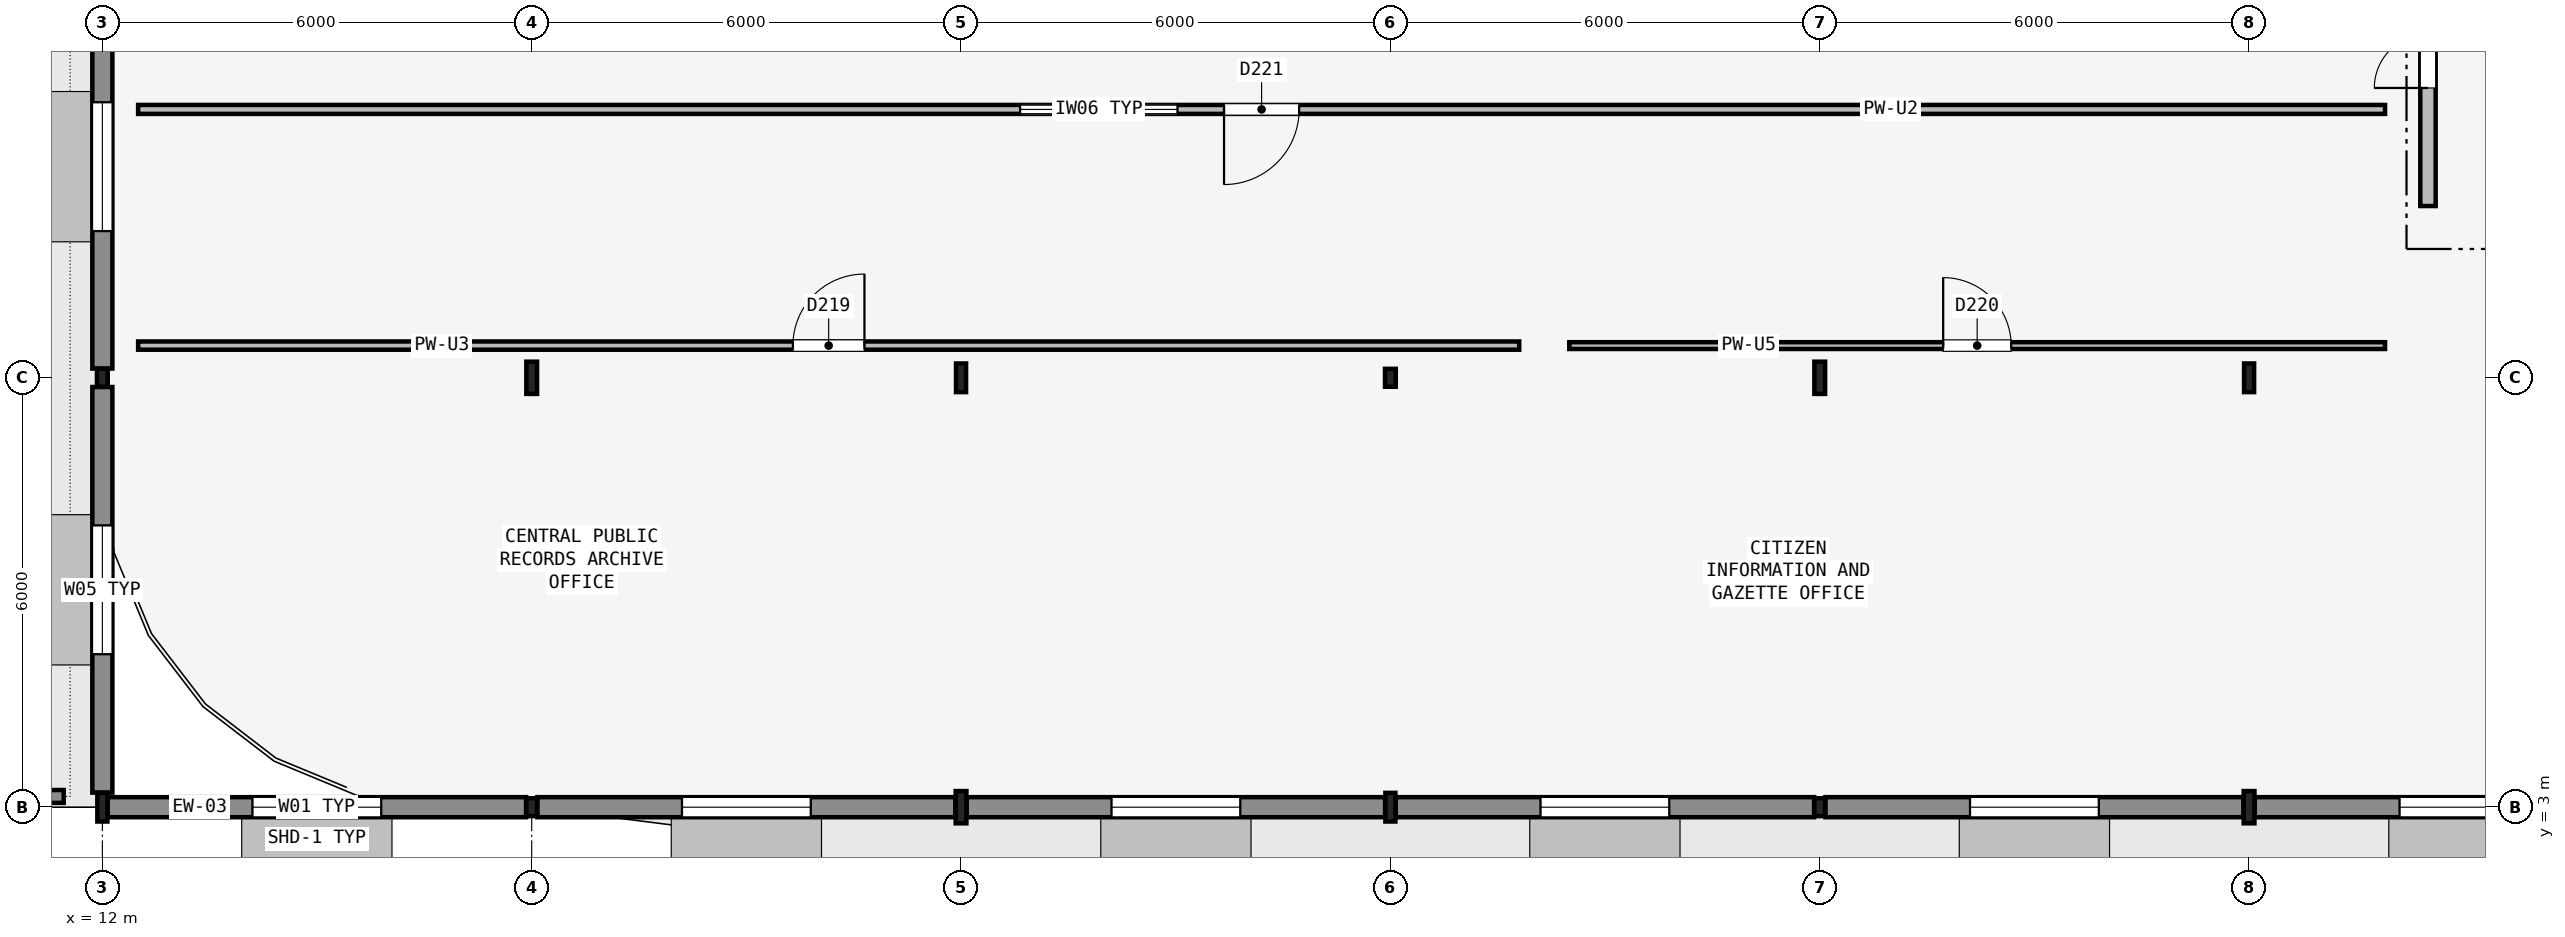
"""IFC4 building model, lengths in metres.
Left out: names, types, materials, properties, quantities, classifications, styles, units other than length and angle.
Written with IfcOpenShell. Run it as: python <this file> out.ifc"""

import sys

from ifc_helpers import new_model, si_unit, direction, frame, frame_2d, origin, origin_2d, place, context, subcontext, project, spatial, rectangle, hollow_rectangle, i_section, extrude, element, fill, save


model = new_model("IFC4")
c1 = context("Model", 3, precision=1e-05, world=origin(), true_north=direction((0.0, 1.0)))
c2 = subcontext(c1, "Body", "Model", "MODEL_VIEW")
j1 = project(units=[si_unit("LENGTHUNIT", "METRE"), si_unit("PLANEANGLEUNIT", "RADIAN")], contexts=[c1])
p1 = place(None, origin())
s1 = spatial("IfcSite", under=j1, at=p1, CompositionType="ELEMENT")
p2 = place(p1, origin())
s2 = spatial("IfcBuilding", under=s1, at=p2, CompositionType="ELEMENT")
p3 = place(p2, frame((0.0, 0.0, 9.3)))
s3 = spatial("IfcBuildingStorey", under=s2, at=p3, CompositionType="ELEMENT", Elevation=9.3)
p4 = place(p3, frame((12.0, 3.0, 0.0), z_axis=(0.0, 0.0, 1.0), x_axis=(1.0, 0.0, 0.0)))
e1 = element("IfcColumn", 1, at=p4, inside=s3, PredefinedType="COLUMN", context=c2, shape_type="SweptSolid", body=[
    extrude(i_section(OverallWidth=0.14, OverallDepth=0.4, WebThickness=0.009, FlangeThickness=0.016, FilletRadius=0.014, at=origin_2d()), origin(), (0.0, 0.0, 1.0), 4.2),
])
for number, where, z_axis, x_axis in (
    (2, (12.0, 9.0, 0.0), (0.0, 0.0, 1.0), (1.0, 0.0, 0.0)),
    (3, (18.0, 3.0, 0.0), (0.0, 0.0, 1.0), (1.0, 0.0, 0.0)),
):
    element("IfcColumn", number, at=place(p3, frame(where, z_axis=z_axis, x_axis=x_axis)), inside=s3, PredefinedType="COLUMN", context=c2, shape_type="SweptSolid", body=[
        extrude(hollow_rectangle(XDim=0.15, YDim=0.25, WallThickness=0.01, InnerFilletRadius=0.01, OuterFilletRadius=0.02, at=origin_2d()), origin(), (0.0, 0.0, 1.0), 4.2),
    ])
for number, where, z_axis, x_axis in (
    (4, (18.0, 9.0, 0.0), (0.0, 0.0, 1.0), (1.0, 0.0, 0.0)),
    (5, (24.0, 3.0, 0.0), (0.0, 0.0, 1.0), (1.0, 0.0, 0.0)),
):
    element("IfcColumn", number, at=place(p3, frame(where, z_axis=z_axis, x_axis=x_axis)), inside=s3, PredefinedType="COLUMN", context=c2, shape_type="SweptSolid", body=[
        extrude(i_section(OverallWidth=0.15, OverallDepth=0.45, WebThickness=0.01, FlangeThickness=0.017, FilletRadius=0.015, at=origin_2d()), origin(), (0.0, 0.0, 1.0), 4.2),
    ])
for number, where, z_axis, x_axis in (
    (6, (24.0, 9.0, 0.0), (0.0, 0.0, 1.0), (1.0, 0.0, 0.0)),
    (7, (30.0, 3.0, 0.0), (0.0, 0.0, 1.0), (1.0, 0.0, 0.0)),
):
    element("IfcColumn", number, at=place(p3, frame(where, z_axis=z_axis, x_axis=x_axis)), inside=s3, PredefinedType="COLUMN", context=c2, shape_type="SweptSolid", body=[
        extrude(i_section(OverallWidth=0.14, OverallDepth=0.4, WebThickness=0.009, FlangeThickness=0.016, FilletRadius=0.014, at=origin_2d()), origin(), (0.0, 0.0, 1.0), 4.2),
    ])
for number, where, z_axis, x_axis in (
    (8, (30.0, 9.0, 0.0), (0.0, 0.0, 1.0), (1.0, 0.0, 0.0)),
    (9, (36.0, 3.0, 0.0), (0.0, 0.0, 1.0), (1.0, 0.0, 0.0)),
):
    element("IfcColumn", number, at=place(p3, frame(where, z_axis=z_axis, x_axis=x_axis)), inside=s3, PredefinedType="COLUMN", context=c2, shape_type="SweptSolid", body=[
        extrude(hollow_rectangle(XDim=0.15, YDim=0.25, WallThickness=0.01, InnerFilletRadius=0.01, OuterFilletRadius=0.02, at=origin_2d()), origin(), (0.0, 0.0, 1.0), 4.2),
    ])
for number, where, z_axis, x_axis in (
    (10, (36.0, 9.0, 0.0), (0.0, 0.0, 1.0), (1.0, 0.0, 0.0)),
    (11, (42.0, 3.0, 0.0), (0.0, 0.0, 1.0), (1.0, 0.0, 0.0)),
):
    element("IfcColumn", number, at=place(p3, frame(where, z_axis=z_axis, x_axis=x_axis)), inside=s3, PredefinedType="COLUMN", context=c2, shape_type="SweptSolid", body=[
        extrude(i_section(OverallWidth=0.15, OverallDepth=0.45, WebThickness=0.01, FlangeThickness=0.017, FilletRadius=0.015, at=origin_2d()), origin(), (0.0, 0.0, 1.0), 4.2),
    ])
p5 = place(p3, frame((42.0, 9.0, 0.0), z_axis=(0.0, 0.0, 1.0), x_axis=(1.0, 0.0, 0.0)))
e12 = element("IfcColumn", 12, at=p5, inside=s3, PredefinedType="COLUMN", context=c2, shape_type="SweptSolid", body=[
    extrude(i_section(OverallWidth=0.14, OverallDepth=0.4, WebThickness=0.009, FlangeThickness=0.016, FilletRadius=0.014, at=origin_2d()), origin(), (0.0, 0.0, 1.0), 4.2),
])
p6 = place(p3, frame((12.074, 3.0, 0.0), z_axis=(0.0, 0.0, 1.0), x_axis=(1.0, 0.0, 0.0)))
e13 = element("IfcWall", 13, at=p6, inside=s3, PredefinedType="SOLIDWALL", context=c2, shape_type="SweptSolid", body=[
    extrude(rectangle(XDim=5.847, YDim=0.28, at=frame_2d((2.923, 0.0))), origin(), (0.0, 0.0, 1.0), 3.484),
])
p7 = place(p6, frame((2.023, 0.0, 0.9)))
e14 = element("IfcOpeningElement", 14, at=p7, cuts=e13, PredefinedType="OPENING", context=c2, shape_type="SweptSolid", body=[
    extrude(rectangle(XDim=1.8, YDim=1.5, at=frame_2d((0.9, 0.75))), frame((0.0, 0.15, 0.0), z_axis=(0.0, -1.0, 0.0), x_axis=(1.0, 0.0, 0.0)), (0.0, 0.0, 1.0), 0.3),
])
p8 = place(p3, frame((18.079, 3.0, 0.0), z_axis=(0.0, 0.0, 1.0), x_axis=(1.0, 0.0, 0.0)))
e15 = element("IfcWall", 15, at=p8, inside=s3, PredefinedType="SOLIDWALL", context=c2, shape_type="SweptSolid", body=[
    extrude(rectangle(XDim=5.842, YDim=0.28, at=frame_2d((2.921, 0.0))), origin(), (0.0, 0.0, 1.0), 3.484),
])
p9 = place(p8, frame((2.021, 0.0, 0.9)))
e16 = element("IfcOpeningElement", 16, at=p9, cuts=e15, PredefinedType="OPENING", context=c2, shape_type="SweptSolid", body=[
    extrude(rectangle(XDim=1.8, YDim=1.5, at=frame_2d((0.9, 0.75))), frame((0.0, 0.15, 0.0), z_axis=(0.0, -1.0, 0.0), x_axis=(1.0, 0.0, 0.0)), (0.0, 0.0, 1.0), 0.3),
])
p10 = place(p3, frame((24.079, 3.0, 0.0), z_axis=(0.0, 0.0, 1.0), x_axis=(1.0, 0.0, 0.0)))
e17 = element("IfcWall", 17, at=p10, inside=s3, PredefinedType="SOLIDWALL", context=c2, shape_type="SweptSolid", body=[
    extrude(rectangle(XDim=5.847, YDim=0.28, at=frame_2d((2.923, 0.0))), origin(), (0.0, 0.0, 1.0), 3.484),
])
p11 = place(p10, frame((2.023, 0.0, 0.9)))
e18 = element("IfcOpeningElement", 18, at=p11, cuts=e17, PredefinedType="OPENING", context=c2, shape_type="SweptSolid", body=[
    extrude(rectangle(XDim=1.8, YDim=1.5, at=frame_2d((0.9, 0.75))), frame((0.0, 0.15, 0.0), z_axis=(0.0, -1.0, 0.0), x_axis=(1.0, 0.0, 0.0)), (0.0, 0.0, 1.0), 0.3),
])
p12 = place(p3, frame((30.074, 3.0, 0.0), z_axis=(0.0, 0.0, 1.0), x_axis=(1.0, 0.0, 0.0)))
e19 = element("IfcWall", 19, at=p12, inside=s3, PredefinedType="SOLIDWALL", context=c2, shape_type="SweptSolid", body=[
    extrude(rectangle(XDim=5.847, YDim=0.28, at=frame_2d((2.923, 0.0))), origin(), (0.0, 0.0, 1.0), 3.484),
])
p13 = place(p12, frame((2.023, 0.0, 0.9)))
e20 = element("IfcOpeningElement", 20, at=p13, cuts=e19, PredefinedType="OPENING", context=c2, shape_type="SweptSolid", body=[
    extrude(rectangle(XDim=1.8, YDim=1.5, at=frame_2d((0.9, 0.75))), frame((0.0, 0.15, 0.0), z_axis=(0.0, -1.0, 0.0), x_axis=(1.0, 0.0, 0.0)), (0.0, 0.0, 1.0), 0.3),
])
p14 = place(p3, frame((36.079, 3.0, 0.0), z_axis=(0.0, 0.0, 1.0), x_axis=(1.0, 0.0, 0.0)))
e21 = element("IfcWall", 21, at=p14, inside=s3, PredefinedType="SOLIDWALL", context=c2, shape_type="SweptSolid", body=[
    extrude(rectangle(XDim=5.842, YDim=0.28, at=frame_2d((2.921, 0.0))), origin(), (0.0, 0.0, 1.0), 3.484),
])
p15 = place(p14, frame((2.021, 0.0, 0.9)))
e22 = element("IfcOpeningElement", 22, at=p15, cuts=e21, PredefinedType="OPENING", context=c2, shape_type="SweptSolid", body=[
    extrude(rectangle(XDim=1.8, YDim=1.5, at=frame_2d((0.9, 0.75))), frame((0.0, 0.15, 0.0), z_axis=(0.0, -1.0, 0.0), x_axis=(1.0, 0.0, 0.0)), (0.0, 0.0, 1.0), 0.3),
])
p16 = place(p3, frame((42.079, 3.0, 0.0), z_axis=(0.0, 0.0, 1.0), x_axis=(1.0, 0.0, 0.0)))
e23 = element("IfcWall", 23, at=p16, inside=s3, PredefinedType="SOLIDWALL", context=c2, shape_type="SweptSolid", body=[
    extrude(rectangle(XDim=5.847, YDim=0.28, at=frame_2d((2.923, 0.0))), origin(), (0.0, 0.0, 1.0), 3.484),
])
p17 = place(p16, frame((2.023, 0.0, 0.9)))
e24 = element("IfcOpeningElement", 24, at=p17, cuts=e23, PredefinedType="OPENING", context=c2, shape_type="SweptSolid", body=[
    extrude(rectangle(XDim=1.8, YDim=1.5, at=frame_2d((0.9, 0.75))), frame((0.0, 0.15, 0.0), z_axis=(0.0, -1.0, 0.0), x_axis=(1.0, 0.0, 0.0)), (0.0, 0.0, 1.0), 0.3),
])
p18 = place(p3, frame((12.0, 3.204, 0.0), z_axis=(0.0, 0.0, 1.0), x_axis=(0.0, 1.0, 0.0)))
e25 = element("IfcWall", 25, at=p18, inside=s3, PredefinedType="SOLIDWALL", context=c2, shape_type="SweptSolid", body=[
    extrude(rectangle(XDim=5.667, YDim=0.28, at=frame_2d((2.833, 0.0))), origin(), (0.0, 0.0, 1.0), 3.484),
])
p19 = place(p18, frame((1.934, 0.0, 1.1)))
e26 = element("IfcOpeningElement", 26, at=p19, cuts=e25, PredefinedType="OPENING", context=c2, shape_type="SweptSolid", body=[
    extrude(rectangle(XDim=1.8, YDim=1.2, at=frame_2d((0.9, 0.6))), frame((0.0, 0.15, 0.0), z_axis=(0.0, -1.0, 0.0), x_axis=(1.0, 0.0, 0.0)), (0.0, 0.0, 1.0), 0.3),
])
p20 = place(p3, frame((12.0, 9.129, 0.0), z_axis=(0.0, 0.0, 1.0), x_axis=(0.0, 1.0, 0.0)))
e27 = element("IfcWall", 27, at=p20, inside=s3, PredefinedType="SOLIDWALL", context=c2, shape_type="SweptSolid", body=[
    extrude(rectangle(XDim=5.642, YDim=0.28, at=frame_2d((2.821, 0.0))), origin(), (0.0, 0.0, 1.0), 3.39),
])
p21 = place(p20, frame((1.921, 0.0, 1.1)))
e28 = element("IfcOpeningElement", 28, at=p21, cuts=e27, PredefinedType="OPENING", context=c2, shape_type="SweptSolid", body=[
    extrude(rectangle(XDim=1.8, YDim=1.2, at=frame_2d((0.9, 0.6))), frame((0.0, 0.15, 0.0), z_axis=(0.0, -1.0, 0.0), x_axis=(1.0, 0.0, 0.0)), (0.0, 0.0, 1.0), 0.3),
])
p22 = place(p3, frame((4.44, 3.15, 0.0), z_axis=(0.0, 0.0, 1.0), x_axis=(1.0, 0.0, 0.0)))
e29 = element("IfcWall", 29, at=p22, inside=s3, PredefinedType="PARAPET", context=c2, shape_type="SweptSolid", body=[
    extrude(rectangle(XDim=7.02, YDim=0.18, at=frame_2d((3.51, 0.0))), origin(), (0.0, 0.0, 1.0), 1.1),
])
p23 = place(p3, frame((44.5, 11.4, 0.0), z_axis=(0.0, 0.0, 1.0), x_axis=(0.0, 1.0, 0.0)))
e30 = element("IfcWall", 30, at=p23, inside=s3, PredefinedType="PARTITIONING", context=c2, shape_type="SweptSolid", body=[
    extrude(rectangle(XDim=4.8, YDim=0.215, at=frame_2d((2.4, 0.0))), origin(), (0.0, 0.0, 1.0), 3.44),
])
p24 = place(p23, frame((1.65, 0.0, 0.0)))
e31 = element("IfcOpeningElement", 31, at=p24, cuts=e30, PredefinedType="OPENING", context=c2, shape_type="SweptSolid", body=[
    extrude(rectangle(XDim=1.5, YDim=2.15, at=frame_2d((0.75, 1.075))), frame((0.0, 0.117, 0.0), z_axis=(0.0, -1.0, 0.0), x_axis=(1.0, 0.0, 0.0)), (0.0, 0.0, 1.0), 0.235),
])
p25 = place(p3, frame((12.5, 9.45, 0.0), z_axis=(0.0, 0.0, 1.0), x_axis=(1.0, 0.0, 0.0)))
e32 = element("IfcWall", 32, at=p25, inside=s3, PredefinedType="PARTITIONING", context=c2, shape_type="SweptSolid", body=[
    extrude(rectangle(XDim=19.3, YDim=0.115, at=frame_2d((9.65, 0.0))), origin(), (0.0, 0.0, 1.0), 3.49),
])
p26 = place(p25, frame((9.15, 0.0, 0.0)))
e33 = element("IfcOpeningElement", 33, at=p26, cuts=e32, PredefinedType="OPENING", context=c2, shape_type="SweptSolid", body=[
    extrude(rectangle(XDim=1.0, YDim=2.15, at=frame_2d((0.5, 1.075))), frame((0.0, 0.067, 0.0), z_axis=(0.0, -1.0, 0.0), x_axis=(1.0, 0.0, 0.0)), (0.0, 0.0, 1.0), 0.135),
])
p27 = place(p3, frame((32.5, 9.45, 0.0), z_axis=(0.0, 0.0, 1.0), x_axis=(1.0, 0.0, 0.0)))
e34 = element("IfcWall", 34, at=p27, inside=s3, PredefinedType="PARTITIONING", context=c2, shape_type="SweptSolid", body=[
    extrude(rectangle(XDim=11.4, YDim=0.095, at=frame_2d((5.7, 0.0))), origin(), (0.0, 0.0, 1.0), 3.49),
])
p28 = place(p27, frame((5.225, 0.0, 0.0)))
e35 = element("IfcOpeningElement", 35, at=p28, cuts=e34, PredefinedType="OPENING", context=c2, shape_type="SweptSolid", body=[
    extrude(rectangle(XDim=0.95, YDim=2.15, at=frame_2d((0.475, 1.075))), frame((0.0, 0.057, 0.0), z_axis=(0.0, -1.0, 0.0), x_axis=(1.0, 0.0, 0.0)), (0.0, 0.0, 1.0), 0.115),
])
p29 = place(p3, frame((43.9, 12.75, 0.0), z_axis=(0.0, 0.0, 1.0), x_axis=(-1.0, 0.0, 0.0)))
e36 = element("IfcWall", 36, at=p29, inside=s3, PredefinedType="PARTITIONING", context=c2, shape_type="SweptSolid", body=[
    extrude(rectangle(XDim=31.4, YDim=0.125, at=frame_2d((15.7, 0.0))), origin(), (0.0, 0.0, 1.0), 3.49),
])
p30 = place(p29, frame((15.175, 0.0, 0.0)))
e37 = element("IfcOpeningElement", 37, at=p30, cuts=e36, PredefinedType="OPENING", context=c2, shape_type="SweptSolid", body=[
    extrude(rectangle(XDim=1.05, YDim=2.2, at=frame_2d((0.525, 1.1))), frame((0.0, 0.073, 0.0), z_axis=(0.0, -1.0, 0.0), x_axis=(1.0, 0.0, 0.0)), (0.0, 0.0, 1.0), 0.145),
])
p31 = place(p29, frame((16.875, 0.0, 0.9)))
e38 = element("IfcOpeningElement", 38, at=p31, cuts=e36, PredefinedType="OPENING", context=c2, shape_type="SweptSolid", body=[
    extrude(rectangle(XDim=2.2, YDim=1.4, at=frame_2d((1.1, 0.7))), frame((0.0, 0.073, 0.0), z_axis=(0.0, -1.0, 0.0), x_axis=(1.0, 0.0, 0.0)), (0.0, 0.0, 1.0), 0.145),
])
p32 = place(p7, origin())
e39 = element("IfcWindow", 39, at=p32, inside=s3, PartitioningType="SINGLE_PANEL", PredefinedType="WINDOW", context=c2, shape_type="SweptSolid", body=[
    extrude(rectangle(XDim=1.8, YDim=1.5, at=frame_2d((0.9, 0.75))), frame((0.0, 0.03, 0.0), z_axis=(0.0, -1.0, 0.0), x_axis=(1.0, 0.0, 0.0)), (0.0, 0.0, 1.0), 0.06),
])
fill(e14, e39)
p33 = place(p9, origin())
e40 = element("IfcWindow", 40, at=p33, inside=s3, PartitioningType="SINGLE_PANEL", PredefinedType="WINDOW", context=c2, shape_type="SweptSolid", body=[
    extrude(rectangle(XDim=1.8, YDim=1.5, at=frame_2d((0.9, 0.75))), frame((0.0, 0.03, 0.0), z_axis=(0.0, -1.0, 0.0), x_axis=(1.0, 0.0, 0.0)), (0.0, 0.0, 1.0), 0.06),
])
fill(e16, e40)
p34 = place(p11, origin())
e41 = element("IfcWindow", 41, at=p34, inside=s3, PartitioningType="SINGLE_PANEL", PredefinedType="WINDOW", context=c2, shape_type="SweptSolid", body=[
    extrude(rectangle(XDim=1.8, YDim=1.5, at=frame_2d((0.9, 0.75))), frame((0.0, 0.03, 0.0), z_axis=(0.0, -1.0, 0.0), x_axis=(1.0, 0.0, 0.0)), (0.0, 0.0, 1.0), 0.06),
])
fill(e18, e41)
p35 = place(p13, origin())
e42 = element("IfcWindow", 42, at=p35, inside=s3, PartitioningType="SINGLE_PANEL", PredefinedType="WINDOW", context=c2, shape_type="SweptSolid", body=[
    extrude(rectangle(XDim=1.8, YDim=1.5, at=frame_2d((0.9, 0.75))), frame((0.0, 0.03, 0.0), z_axis=(0.0, -1.0, 0.0), x_axis=(1.0, 0.0, 0.0)), (0.0, 0.0, 1.0), 0.06),
])
fill(e20, e42)
p36 = place(p15, origin())
e43 = element("IfcWindow", 43, at=p36, inside=s3, PartitioningType="SINGLE_PANEL", PredefinedType="WINDOW", context=c2, shape_type="SweptSolid", body=[
    extrude(rectangle(XDim=1.8, YDim=1.5, at=frame_2d((0.9, 0.75))), frame((0.0, 0.03, 0.0), z_axis=(0.0, -1.0, 0.0), x_axis=(1.0, 0.0, 0.0)), (0.0, 0.0, 1.0), 0.06),
])
fill(e22, e43)
p37 = place(p17, origin())
e44 = element("IfcWindow", 44, at=p37, inside=s3, PartitioningType="SINGLE_PANEL", PredefinedType="WINDOW", context=c2, shape_type="SweptSolid", body=[
    extrude(rectangle(XDim=1.8, YDim=1.5, at=frame_2d((0.9, 0.75))), frame((0.0, 0.03, 0.0), z_axis=(0.0, -1.0, 0.0), x_axis=(1.0, 0.0, 0.0)), (0.0, 0.0, 1.0), 0.06),
])
fill(e24, e44)
p38 = place(p19, origin())
e45 = element("IfcWindow", 45, at=p38, inside=s3, PartitioningType="SINGLE_PANEL", PredefinedType="WINDOW", context=c2, shape_type="SweptSolid", body=[
    extrude(rectangle(XDim=1.8, YDim=1.2, at=frame_2d((0.9, 0.6))), frame((0.0, 0.03, 0.0), z_axis=(0.0, -1.0, 0.0), x_axis=(1.0, 0.0, 0.0)), (0.0, 0.0, 1.0), 0.06),
])
fill(e26, e45)
p39 = place(p21, origin())
e46 = element("IfcWindow", 46, at=p39, inside=s3, PartitioningType="SINGLE_PANEL", PredefinedType="WINDOW", context=c2, shape_type="SweptSolid", body=[
    extrude(rectangle(XDim=1.8, YDim=1.2, at=frame_2d((0.9, 0.6))), frame((0.0, 0.03, 0.0), z_axis=(0.0, -1.0, 0.0), x_axis=(1.0, 0.0, 0.0)), (0.0, 0.0, 1.0), 0.06),
])
fill(e28, e46)
p40 = place(p24, origin())
e47 = element("IfcDoor", 47, at=p40, inside=s3, OperationType="DOUBLE_DOOR_SINGLE_SWING", PredefinedType="DOOR", context=c2, shape_type="SweptSolid", body=[
    extrude(rectangle(XDim=1.5, YDim=2.15, at=frame_2d((0.75, 1.075))), frame((0.0, 0.025, 0.0), z_axis=(0.0, -1.0, 0.0), x_axis=(1.0, 0.0, 0.0)), (0.0, 0.0, 1.0), 0.05),
])
fill(e31, e47)
p41 = place(p26, origin())
e48 = element("IfcDoor", 48, at=p41, inside=s3, OperationType="SINGLE_SWING_RIGHT", PredefinedType="DOOR", context=c2, shape_type="SweptSolid", body=[
    extrude(rectangle(XDim=1.0, YDim=2.15, at=frame_2d((0.5, 1.075))), frame((0.0, 0.025, 0.0), z_axis=(0.0, -1.0, 0.0), x_axis=(1.0, 0.0, 0.0)), (0.0, 0.0, 1.0), 0.05),
])
fill(e33, e48)
p42 = place(p28, origin())
e49 = element("IfcDoor", 49, at=p42, inside=s3, OperationType="SINGLE_SWING_LEFT", PredefinedType="DOOR", context=c2, shape_type="SweptSolid", body=[
    extrude(rectangle(XDim=0.95, YDim=2.15, at=frame_2d((0.475, 1.075))), frame((0.0, 0.025, 0.0), z_axis=(0.0, -1.0, 0.0), x_axis=(1.0, 0.0, 0.0)), (0.0, 0.0, 1.0), 0.05),
])
fill(e35, e49)
p43 = place(p30, origin())
e50 = element("IfcDoor", 50, at=p43, inside=s3, OperationType="SINGLE_SWING_RIGHT", PredefinedType="DOOR", context=c2, shape_type="SweptSolid", body=[
    extrude(rectangle(XDim=1.05, YDim=2.2, at=frame_2d((0.525, 1.1))), frame((0.0, 0.025, 0.0), z_axis=(0.0, -1.0, 0.0), x_axis=(1.0, 0.0, 0.0)), (0.0, 0.0, 1.0), 0.05),
])
fill(e37, e50)
p44 = place(p31, origin())
e51 = element("IfcWindow", 51, at=p44, inside=s3, PartitioningType="SINGLE_PANEL", PredefinedType="WINDOW", context=c2, shape_type="SweptSolid", body=[
    extrude(rectangle(XDim=2.2, YDim=1.4, at=frame_2d((1.1, 0.7))), frame((0.0, 0.03, 0.0), z_axis=(0.0, -1.0, 0.0), x_axis=(1.0, 0.0, 0.0)), (0.0, 0.0, 1.0), 0.06),
])
fill(e38, e51)
save(model, sys.argv[1])
